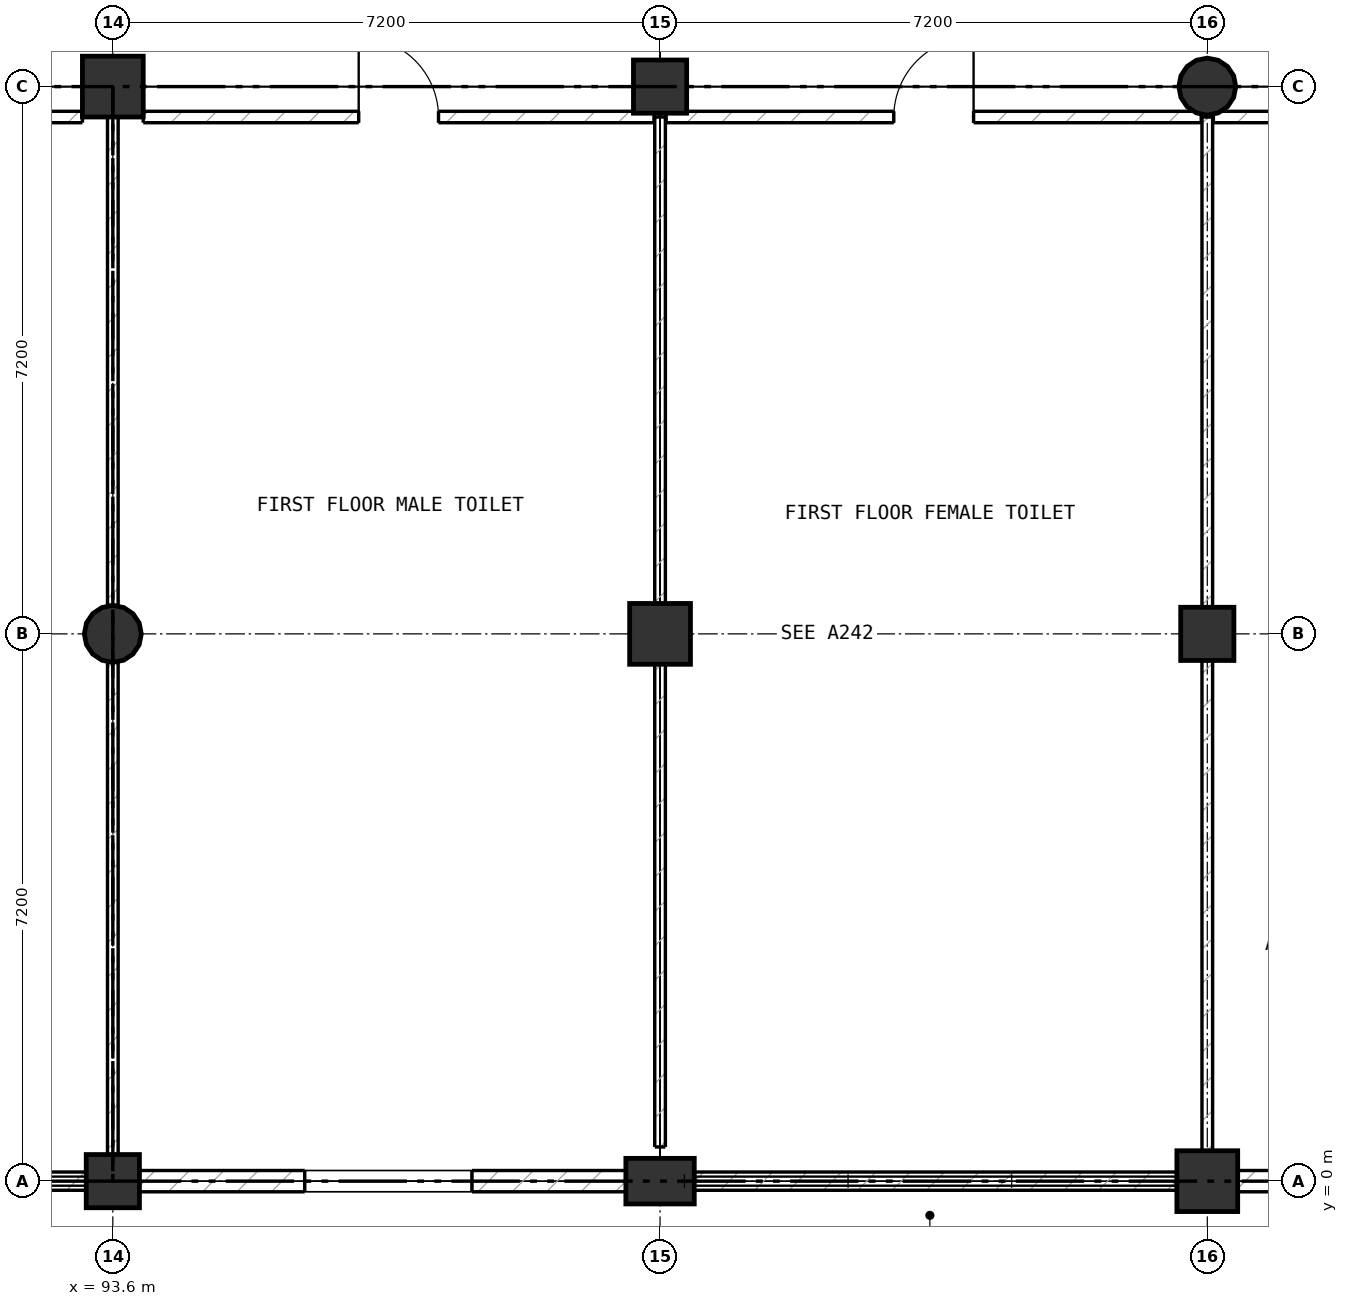
"""IFC4 building model, lengths in metres.
Left out: names, types, materials, properties, quantities, classifications, styles, units other than length and angle.
Written with IfcOpenShell. Run it as: python <this file> out.ifc"""

import sys

from ifc_helpers import new_model, si_unit, direction, frame, frame_2d, origin, origin_2d, place, context, subcontext, project, spatial, rectangle, circle, extrude, element, fill, save


model = new_model("IFC4")
c1 = context("Model", 3, precision=1e-05, world=origin(), true_north=direction((0.0, 1.0)))
c2 = subcontext(c1, "Body", "Model", "MODEL_VIEW")
j1 = project(units=[si_unit("LENGTHUNIT", "METRE"), si_unit("PLANEANGLEUNIT", "RADIAN")], contexts=[c1])
p1 = place(None, origin())
s1 = spatial("IfcSite", under=j1, at=p1, CompositionType="ELEMENT")
p2 = place(p1, origin())
s2 = spatial("IfcBuilding", under=s1, at=p2, CompositionType="ELEMENT")
p3 = place(p2, frame((0.0, 0.0, 5.6)))
s3 = spatial("IfcBuildingStorey", under=s2, at=p3, CompositionType="ELEMENT", Elevation=5.6)
p4 = place(p3, frame((93.6, 0.0, 0.0), z_axis=(0.0, 0.0, 1.0), x_axis=(1.0, 0.0, 0.0)))
e1 = element("IfcColumn", 1, at=p4, inside=s3, PredefinedType="COLUMN", context=c2, shape_type="SweptSolid", body=[
    extrude(rectangle(XDim=0.7, YDim=0.7, at=origin_2d()), origin(), (0.0, 0.0, 1.0), 5.6),
])
p5 = place(p3, frame((93.6, 7.2, 0.0), z_axis=(0.0, 0.0, 1.0), x_axis=(1.0, 0.0, 0.0)))
e2 = element("IfcColumn", 2, at=p5, inside=s3, PredefinedType="COLUMN", context=c2, shape_type="SweptSolid", body=[
    extrude(circle(Radius=0.375, at=origin_2d()), origin(), (0.0, 0.0, 1.0), 5.6),
])
p6 = place(p3, frame((93.6, 14.4, 0.0), z_axis=(0.0, 0.0, 1.0), x_axis=(1.0, 0.0, 0.0)))
e3 = element("IfcColumn", 3, at=p6, inside=s3, PredefinedType="COLUMN", context=c2, shape_type="SweptSolid", body=[
    extrude(rectangle(XDim=0.8, YDim=0.8, at=origin_2d()), origin(), (0.0, 0.0, 1.0), 5.6),
])
p7 = place(p3, frame((100.8, 0.0, 0.0), z_axis=(0.0, 0.0, 1.0), x_axis=(1.0, 0.0, 0.0)))
e4 = element("IfcColumn", 4, at=p7, inside=s3, PredefinedType="COLUMN", context=c2, shape_type="SweptSolid", body=[
    extrude(rectangle(XDim=0.6, YDim=0.9, at=origin_2d()), origin(), (0.0, 0.0, 1.0), 5.6),
])
p8 = place(p3, frame((100.8, 7.2, 0.0), z_axis=(0.0, 0.0, 1.0), x_axis=(1.0, 0.0, 0.0)))
e5 = element("IfcColumn", 5, at=p8, inside=s3, PredefinedType="COLUMN", context=c2, shape_type="SweptSolid", body=[
    extrude(rectangle(XDim=0.8, YDim=0.8, at=origin_2d()), origin(), (0.0, 0.0, 1.0), 5.6),
])
p9 = place(p3, frame((100.8, 14.4, 0.0), z_axis=(0.0, 0.0, 1.0), x_axis=(1.0, 0.0, 0.0)))
e6 = element("IfcColumn", 6, at=p9, inside=s3, PredefinedType="COLUMN", context=c2, shape_type="SweptSolid", body=[
    extrude(rectangle(XDim=0.7, YDim=0.7, at=origin_2d()), origin(), (0.0, 0.0, 1.0), 5.6),
])
p10 = place(p3, frame((108.0, 0.0, 0.0), z_axis=(0.0, 0.0, 1.0), x_axis=(1.0, 0.0, 0.0)))
e7 = element("IfcColumn", 7, at=p10, inside=s3, PredefinedType="COLUMN", context=c2, shape_type="SweptSolid", body=[
    extrude(rectangle(XDim=0.8, YDim=0.8, at=origin_2d()), origin(), (0.0, 0.0, 1.0), 5.6),
])
p11 = place(p3, frame((108.0, 7.2, 0.0), z_axis=(0.0, 0.0, 1.0), x_axis=(1.0, 0.0, 0.0)))
e8 = element("IfcColumn", 8, at=p11, inside=s3, PredefinedType="COLUMN", context=c2, shape_type="SweptSolid", body=[
    extrude(rectangle(XDim=0.7, YDim=0.7, at=origin_2d()), origin(), (0.0, 0.0, 1.0), 5.6),
])
p12 = place(p3, frame((108.0, 14.4, 0.0), z_axis=(0.0, 0.0, 1.0), x_axis=(1.0, 0.0, 0.0)))
e9 = element("IfcColumn", 9, at=p12, inside=s3, PredefinedType="COLUMN", context=c2, shape_type="SweptSolid", body=[
    extrude(circle(Radius=0.375, at=origin_2d()), origin(), (0.0, 0.0, 1.0), 5.6),
])
p13 = place(p3, frame((114.865, 0.0, 0.0), z_axis=(0.0, 0.0, 1.0), x_axis=(-1.0, 0.0, 0.0)))
e10 = element("IfcWall", 10, at=p13, inside=s3, PredefinedType="SOLIDWALL", context=c2, shape_type="SweptSolid", body=[
    extrude(rectangle(XDim=6.48, YDim=0.28, at=frame_2d((3.24, 0.0))), origin(), (0.0, 0.0, 1.0), 4.985),
])
p14 = place(p13, frame((2.14, 0.0, 1.0)))
e11 = element("IfcOpeningElement", 11, at=p14, cuts=e10, PredefinedType="OPENING", context=c2, shape_type="SweptSolid", body=[
    extrude(rectangle(XDim=2.2, YDim=1.8, at=frame_2d((1.1, 0.9))), frame((0.0, 0.15, 0.0), z_axis=(0.0, -1.0, 0.0), x_axis=(1.0, 0.0, 0.0)), (0.0, 0.0, 1.0), 0.3),
])
p15 = place(p3, frame((107.615, 0.0, 0.0), z_axis=(0.0, 0.0, 1.0), x_axis=(-1.0, 0.0, 0.0)))
e12 = element("IfcWall", 12, at=p15, inside=s3, PredefinedType="SOLIDWALL", context=c2, shape_type="SweptSolid", body=[
    extrude(rectangle(XDim=6.53, YDim=0.24, at=frame_2d((3.265, 0.0))), origin(), (0.0, 0.0, 1.0), 0.35),
])
p16 = place(p3, frame((100.515, 0.0, 0.0), z_axis=(0.0, 0.0, 1.0), x_axis=(-1.0, 0.0, 0.0)))
e13 = element("IfcWall", 13, at=p16, inside=s3, PredefinedType="SOLIDWALL", context=c2, shape_type="SweptSolid", body=[
    extrude(rectangle(XDim=6.58, YDim=0.28, at=frame_2d((3.29, 0.0))), origin(), (0.0, 0.0, 1.0), 4.985),
])
p17 = place(p16, frame((2.19, 0.0, 1.0)))
e14 = element("IfcOpeningElement", 14, at=p17, cuts=e13, PredefinedType="OPENING", context=c2, shape_type="SweptSolid", body=[
    extrude(rectangle(XDim=2.2, YDim=1.8, at=frame_2d((1.1, 0.9))), frame((0.0, 0.15, 0.0), z_axis=(0.0, -1.0, 0.0), x_axis=(1.0, 0.0, 0.0)), (0.0, 0.0, 1.0), 0.3),
])
p18 = place(p3, frame((93.265, 0.0, 0.0), z_axis=(0.0, 0.0, 1.0), x_axis=(-1.0, 0.0, 0.0)))
e15 = element("IfcWall", 15, at=p18, inside=s3, PredefinedType="SOLIDWALL", context=c2, shape_type="SweptSolid", body=[
    extrude(rectangle(XDim=6.48, YDim=0.24, at=frame_2d((3.24, 0.0))), origin(), (0.0, 0.0, 1.0), 0.35),
])
p19 = place(p3, frame((93.6, 0.35, 0.0), z_axis=(0.0, 0.0, 1.0), x_axis=(0.0, 1.0, 0.0)))
e16 = element("IfcWall", 16, at=p19, inside=s3, PredefinedType="PARTITIONING", context=c2, shape_type="SweptSolid", body=[
    extrude(rectangle(XDim=6.475, YDim=0.14, at=frame_2d((3.237, 0.0))), origin(), (0.0, 0.0, 1.0), 4.88),
])
p20 = place(p3, frame((93.6, 7.575, 0.0), z_axis=(0.0, 0.0, 1.0), x_axis=(0.0, 1.0, 0.0)))
e17 = element("IfcWall", 17, at=p20, inside=s3, PredefinedType="PARTITIONING", context=c2, shape_type="SweptSolid", body=[
    extrude(rectangle(XDim=6.425, YDim=0.14, at=frame_2d((3.212, 0.0))), origin(), (0.0, 0.0, 1.0), 4.88),
])
p21 = place(p3, frame((100.8, 0.45, 0.0), z_axis=(0.0, 0.0, 1.0), x_axis=(0.0, 1.0, 0.0)))
e18 = element("IfcWall", 18, at=p21, inside=s3, PredefinedType="PARTITIONING", context=c2, shape_type="SweptSolid", body=[
    extrude(rectangle(XDim=6.35, YDim=0.14, at=frame_2d((3.175, 0.0))), origin(), (0.0, 0.0, 1.0), 4.88),
])
p22 = place(p3, frame((100.8, 7.6, 0.0), z_axis=(0.0, 0.0, 1.0), x_axis=(0.0, 1.0, 0.0)))
e19 = element("IfcWall", 19, at=p22, inside=s3, PredefinedType="PARTITIONING", context=c2, shape_type="SweptSolid", body=[
    extrude(rectangle(XDim=6.4, YDim=0.14, at=frame_2d((3.2, 0.0))), origin(), (0.0, 0.0, 1.0), 4.88),
])
p23 = place(p3, frame((108.0, 0.4, 0.0), z_axis=(0.0, 0.0, 1.0), x_axis=(0.0, 1.0, 0.0)))
e20 = element("IfcWall", 20, at=p23, inside=s3, PredefinedType="PARTITIONING", context=c2, shape_type="SweptSolid", body=[
    extrude(rectangle(XDim=6.45, YDim=0.14, at=frame_2d((3.225, 0.0))), origin(), (0.0, 0.0, 1.0), 4.81),
])
p24 = place(p3, frame((108.0, 7.55, 0.0), z_axis=(0.0, 0.0, 1.0), x_axis=(0.0, 1.0, 0.0)))
e21 = element("IfcWall", 21, at=p24, inside=s3, PredefinedType="PARTITIONING", context=c2, shape_type="SweptSolid", body=[
    extrude(rectangle(XDim=6.45, YDim=0.14, at=frame_2d((3.225, 0.0))), origin(), (0.0, 0.0, 1.0), 4.81),
])
p25 = place(p3, frame((82.875, 14.0, 0.0), z_axis=(0.0, 0.0, 1.0), x_axis=(1.0, 0.0, 0.0)))
e22 = element("IfcWall", 22, at=p25, inside=s3, PredefinedType="PARTITIONING", context=c2, shape_type="SweptSolid", body=[
    extrude(rectangle(XDim=10.325, YDim=0.15, at=frame_2d((5.163, 0.0))), origin(), (0.0, 0.0, 1.0), 5.31),
])
p26 = place(p25, frame((4.413, 0.0, 0.0)))
e23 = element("IfcOpeningElement", 23, at=p26, cuts=e22, PredefinedType="OPENING", context=c2, shape_type="SweptSolid", body=[
    extrude(rectangle(XDim=1.5, YDim=2.2, at=frame_2d((0.75, 1.1))), frame((0.0, 0.085, 0.0), z_axis=(0.0, -1.0, 0.0), x_axis=(1.0, 0.0, 0.0)), (0.0, 0.0, 1.0), 0.17),
])
p27 = place(p3, frame((94.0, 14.0, 0.0), z_axis=(0.0, 0.0, 1.0), x_axis=(1.0, 0.0, 0.0)))
e24 = element("IfcWall", 24, at=p27, inside=s3, PredefinedType="PARTITIONING", context=c2, shape_type="SweptSolid", body=[
    extrude(rectangle(XDim=6.72, YDim=0.15, at=frame_2d((3.36, 0.0))), origin(), (0.0, 0.0, 1.0), 5.31),
])
p28 = place(p27, frame((2.835, 0.0, 0.0)))
e25 = element("IfcOpeningElement", 25, at=p28, cuts=e24, PredefinedType="OPENING", context=c2, shape_type="SweptSolid", body=[
    extrude(rectangle(XDim=1.05, YDim=2.15, at=frame_2d((0.525, 1.075))), frame((0.0, 0.085, 0.0), z_axis=(0.0, -1.0, 0.0), x_axis=(1.0, 0.0, 0.0)), (0.0, 0.0, 1.0), 0.17),
])
p29 = place(p3, frame((100.88, 14.0, 0.0), z_axis=(0.0, 0.0, 1.0), x_axis=(1.0, 0.0, 0.0)))
e26 = element("IfcWall", 26, at=p29, inside=s3, PredefinedType="PARTITIONING", context=c2, shape_type="SweptSolid", body=[
    extrude(rectangle(XDim=7.04, YDim=0.15, at=frame_2d((3.52, 0.0))), origin(), (0.0, 0.0, 1.0), 5.31),
])
p30 = place(p29, frame((2.995, 0.0, 0.0)))
e27 = element("IfcOpeningElement", 27, at=p30, cuts=e26, PredefinedType="OPENING", context=c2, shape_type="SweptSolid", body=[
    extrude(rectangle(XDim=1.05, YDim=2.15, at=frame_2d((0.525, 1.075))), frame((0.0, 0.085, 0.0), z_axis=(0.0, -1.0, 0.0), x_axis=(1.0, 0.0, 0.0)), (0.0, 0.0, 1.0), 0.17),
])
p31 = place(p3, frame((108.08, 14.0, 0.0), z_axis=(0.0, 0.0, 1.0), x_axis=(1.0, 0.0, 0.0)))
e28 = element("IfcWall", 28, at=p31, inside=s3, PredefinedType="PARTITIONING", context=c2, shape_type="SweptSolid", body=[
    extrude(rectangle(XDim=2.74, YDim=0.15, at=frame_2d((1.37, 0.0))), origin(), (0.0, 0.0, 1.0), 5.31),
])
p32 = place(p31, frame((0.845, 0.0, 0.0)))
e29 = element("IfcOpeningElement", 29, at=p32, cuts=e28, PredefinedType="OPENING", context=c2, shape_type="SweptSolid", body=[
    extrude(rectangle(XDim=1.05, YDim=2.15, at=frame_2d((0.525, 1.075))), frame((0.0, 0.085, 0.0), z_axis=(0.0, -1.0, 0.0), x_axis=(1.0, 0.0, 0.0)), (0.0, 0.0, 1.0), 0.17),
])
p33 = place(p17, origin())
e30 = element("IfcWindow", 30, at=p33, inside=s3, PartitioningType="SINGLE_PANEL", PredefinedType="WINDOW", context=c2, shape_type="SweptSolid", body=[
    extrude(rectangle(XDim=2.2, YDim=1.8, at=frame_2d((1.1, 0.9))), frame((0.0, 0.03, 0.0), z_axis=(0.0, -1.0, 0.0), x_axis=(1.0, 0.0, 0.0)), (0.0, 0.0, 1.0), 0.06),
])
fill(e14, e30)
p34 = place(p28, origin())
e31 = element("IfcDoor", 31, at=p34, inside=s3, OperationType="SINGLE_SWING_LEFT", PredefinedType="DOOR", context=c2, shape_type="SweptSolid", body=[
    extrude(rectangle(XDim=1.05, YDim=2.15, at=frame_2d((0.525, 1.075))), frame((0.0, 0.025, 0.0), z_axis=(0.0, -1.0, 0.0), x_axis=(1.0, 0.0, 0.0)), (0.0, 0.0, 1.0), 0.05),
])
fill(e25, e31)
p35 = place(p30, origin())
e32 = element("IfcDoor", 32, at=p35, inside=s3, OperationType="SINGLE_SWING_RIGHT", PredefinedType="DOOR", context=c2, shape_type="SweptSolid", body=[
    extrude(rectangle(XDim=1.05, YDim=2.15, at=frame_2d((0.525, 1.075))), frame((0.0, 0.025, 0.0), z_axis=(0.0, -1.0, 0.0), x_axis=(1.0, 0.0, 0.0)), (0.0, 0.0, 1.0), 0.05),
])
fill(e27, e32)
save(model, sys.argv[1])
